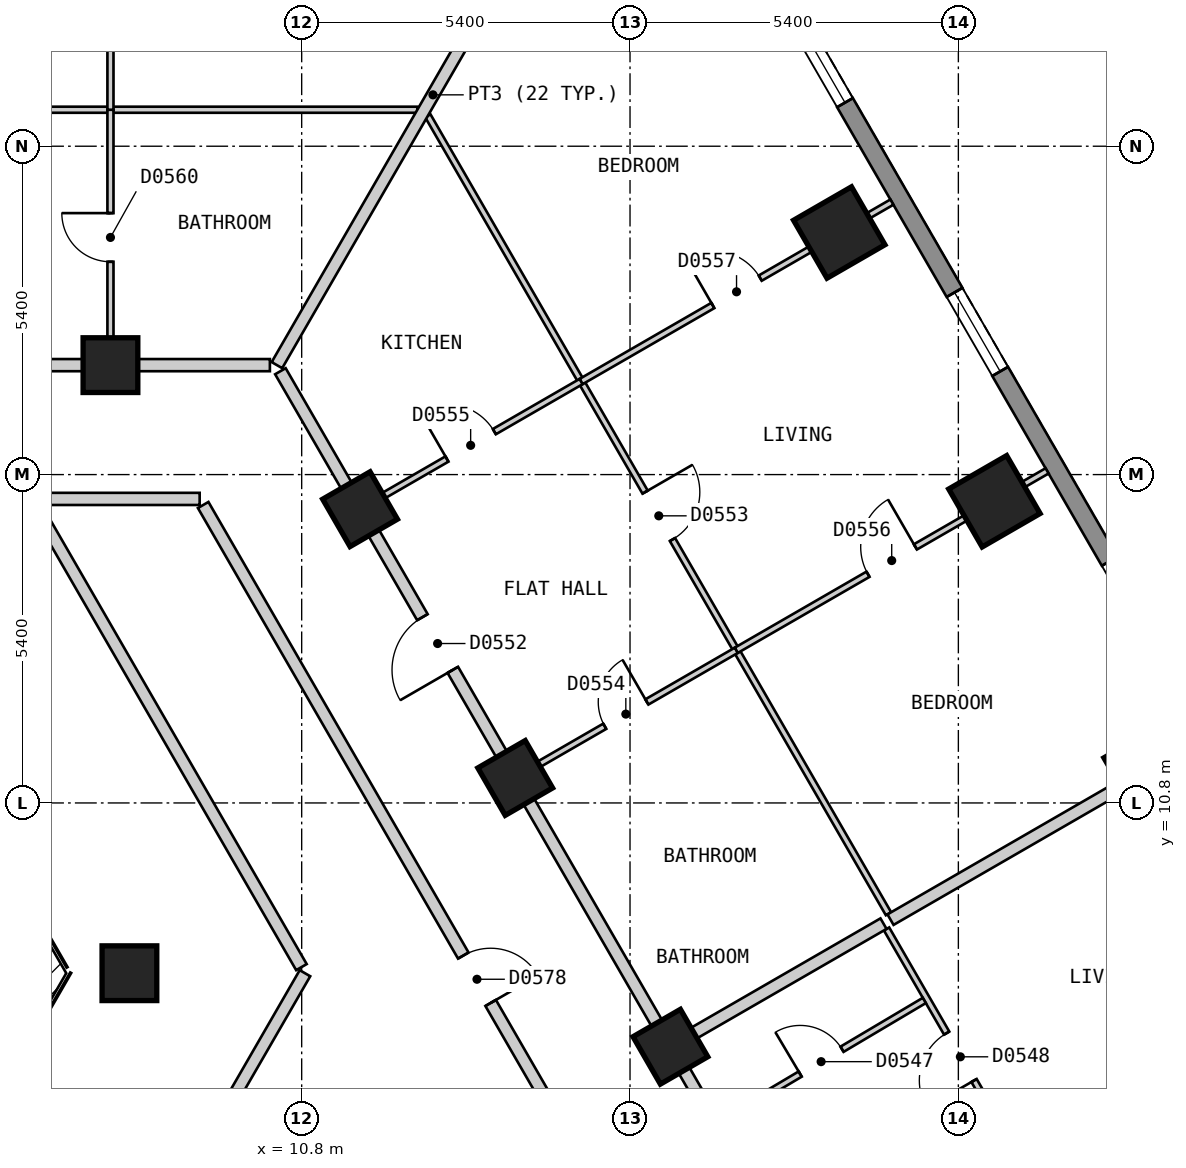
"""IFC4 building model, lengths in metres.
Left out: names, types, materials, properties, quantities, classifications, styles, units other than length and angle.
Written with IfcOpenShell. Run it as: python <this file> out.ifc"""

import sys

from ifc_helpers import new_model, si_unit, direction, frame, frame_2d, origin, origin_2d, place, context, subcontext, project, spatial, polyline, rectangle, outline, extrude, element, fill, save


model = new_model("IFC4")
c1 = context("Model", 3, precision=1e-05, world=origin(), true_north=direction((0.0, 1.0)))
c2 = subcontext(c1, "Body", "Model", "MODEL_VIEW")
j1 = project(units=[si_unit("LENGTHUNIT", "METRE"), si_unit("PLANEANGLEUNIT", "RADIAN")], contexts=[c1])
p1 = place(None, origin())
s1 = spatial("IfcSite", under=j1, at=p1, CompositionType="ELEMENT")
p2 = place(p1, origin())
s2 = spatial("IfcBuilding", under=s1, at=p2, CompositionType="ELEMENT")
p3 = place(p2, frame((0.0, 0.0, 44.4)))
s3 = spatial("IfcBuildingStorey", under=s2, at=p3, CompositionType="ELEMENT", Elevation=44.4)
for number, where, z_axis, x_axis in (
    (1, (24.745, 11.341, 0.0), (0.0, 0.0, 1.0), (-0.5, 0.866, 0.0)),
    (2, (22.193, 15.761, 0.0), (0.0, 0.0, 1.0), (-0.5, 0.866, 0.0)),
    (3, (19.641, 20.181, 0.0), (0.0, 0.0, 1.0), (-0.5, 0.866, 0.0)),
):
    element("IfcColumn", number, at=place(p3, frame(where, z_axis=z_axis, x_axis=x_axis)), inside=s3, PredefinedType="COLUMN", context=c2, shape_type="SweptSolid", body=[
        extrude(rectangle(XDim=1.1, YDim=1.1, at=origin_2d()), origin(), (0.0, 0.0, 1.0), 3.0),
    ])
for number, where, z_axis, x_axis in (
    (4, (16.864, 6.791, 0.0), (0.0, 0.0, 1.0), (-0.5, 0.866, 0.0)),
    (5, (14.312, 11.211, 0.0), (0.0, 0.0, 1.0), (-0.5, 0.866, 0.0)),
    (6, (7.967, 8.0, 0.0), (0.0, 0.0, 1.0), (1.0, 0.0, 0.0)),
    (7, (11.76, 15.631, 0.0), (0.0, 0.0, 1.0), (-0.5, 0.866, 0.0)),
    (8, (7.655, 18.0, 0.0), (0.0, 0.0, 1.0), (-1.0, 0.0, 0.0)),
):
    element("IfcColumn", number, at=place(p3, frame(where, z_axis=z_axis, x_axis=x_axis)), inside=s3, PredefinedType="COLUMN", context=c2, shape_type="SweptSolid", body=[
        extrude(rectangle(XDim=0.9, YDim=0.9, at=origin_2d()), origin(), (0.0, 0.0, 1.0), 3.0),
    ])
p4 = place(p3, frame((31.22, 2.425, 0.0), z_axis=(0.0, 0.0, 1.0), x_axis=(-0.500001938803, 0.866024284413, 0.0)))
e9 = element("IfcWall", 9, at=p4, inside=s3, PredefinedType="SOLIDWALL", context=c2, shape_type="SweptSolid", body=[
    extrude(outline(polyline([(0.0, -0.15), (27.02, -0.15), (26.94, 0.15), (0.08, 0.15), (0.0, -0.15)])), origin(), (0.0, 0.0, 1.0), 2.7),
])
p5 = place(p4, frame((2.553, 0.0, 0.15)))
e10 = element("IfcOpeningElement", 10, at=p5, cuts=e9, PredefinedType="OPENING", context=c2, shape_type="SweptSolid", body=[
    extrude(rectangle(XDim=1.5, YDim=2.1, at=frame_2d((0.75, 1.05))), frame((0.0, 0.16, 0.0), z_axis=(0.0, -1.0, 0.0), x_axis=(1.0, 0.0, 0.0)), (0.0, 0.0, 1.0), 0.32),
])
p6 = place(p4, frame((7.657, 0.0, 0.15)))
e11 = element("IfcOpeningElement", 11, at=p6, cuts=e9, PredefinedType="OPENING", context=c2, shape_type="SweptSolid", body=[
    extrude(rectangle(XDim=1.5, YDim=2.1, at=frame_2d((0.75, 1.05))), frame((0.0, 0.16, 0.0), z_axis=(0.0, -1.0, 0.0), x_axis=(1.0, 0.0, 0.0)), (0.0, 0.0, 1.0), 0.32),
])
p7 = place(p4, frame((12.761, 0.0, 0.15)))
e12 = element("IfcOpeningElement", 12, at=p7, cuts=e9, PredefinedType="OPENING", context=c2, shape_type="SweptSolid", body=[
    extrude(rectangle(XDim=1.5, YDim=2.1, at=frame_2d((0.75, 1.05))), frame((0.0, 0.16, 0.0), z_axis=(0.0, -1.0, 0.0), x_axis=(1.0, 0.0, 0.0)), (0.0, 0.0, 1.0), 0.32),
])
p8 = place(p4, frame((17.865, 0.0, 0.15)))
e13 = element("IfcOpeningElement", 13, at=p8, cuts=e9, PredefinedType="OPENING", context=c2, shape_type="SweptSolid", body=[
    extrude(rectangle(XDim=1.5, YDim=2.1, at=frame_2d((0.75, 1.05))), frame((0.0, 0.16, 0.0), z_axis=(0.0, -1.0, 0.0), x_axis=(1.0, 0.0, 0.0)), (0.0, 0.0, 1.0), 0.32),
])
p9 = place(p4, frame((22.969, 0.0, 0.15)))
e14 = element("IfcOpeningElement", 14, at=p9, cuts=e9, PredefinedType="OPENING", context=c2, shape_type="SweptSolid", body=[
    extrude(rectangle(XDim=1.5, YDim=2.1, at=frame_2d((0.75, 1.05))), frame((0.0, 0.16, 0.0), z_axis=(0.0, -1.0, 0.0), x_axis=(1.0, 0.0, 0.0)), (0.0, 0.0, 1.0), 0.32),
])
p10 = place(p3, frame((6.409, 15.7, 0.0), z_axis=(0.0, 0.0, 1.0), x_axis=(0.499930377127, -0.866065596838, 0.0)))
e15 = element("IfcWall", 15, at=p10, inside=s3, PredefinedType="PARTITIONING", context=c2, shape_type="SweptSolid", body=[
    extrude(rectangle(XDim=8.775, YDim=0.2, at=frame_2d((4.388, 0.0))), origin(), (0.0, 0.0, 1.0), 2.7),
])
p11 = place(p3, frame((9.18, 15.7, 0.0), z_axis=(0.0, 0.0, 1.0), x_axis=(0.500003652032, -0.866023295272, 0.0)))
e16 = element("IfcWall", 16, at=p11, inside=s3, PredefinedType="PARTITIONING", context=c2, shape_type="SweptSolid", body=[
    extrude(rectangle(XDim=18.012, YDim=0.2, at=frame_2d((9.006, 0.0))), origin(), (0.0, 0.0, 1.0), 2.7),
])
p12 = place(p11, frame((8.556, 0.0, 0.0)))
e17 = element("IfcOpeningElement", 17, at=p12, cuts=e16, PredefinedType="OPENING", context=c2, shape_type="SweptSolid", body=[
    extrude(rectangle(XDim=0.9, YDim=2.1, at=frame_2d((0.45, 1.05))), frame((0.0, 0.11, 0.0), z_axis=(0.0, -1.0, 0.0), x_axis=(1.0, 0.0, 0.0)), (0.0, 0.0, 1.0), 0.22),
])
p13 = place(p3, frame((10.45, 17.9, 0.0), z_axis=(0.0, 0.0, 1.0), x_axis=(0.500034352617, -0.866005569383, 0.0)))
e18 = element("IfcWall", 18, at=p13, inside=s3, PredefinedType="PARTITIONING", context=c2, shape_type="SweptSolid", body=[
    extrude(rectangle(XDim=20.553, YDim=0.2, at=frame_2d((10.276, 0.0))), origin(), (0.0, 0.0, 1.0), 2.7),
])
p14 = place(p13, frame((14.902, 0.0, 0.0)))
e19 = element("IfcOpeningElement", 19, at=p14, cuts=e18, PredefinedType="OPENING", context=c2, shape_type="SweptSolid", body=[
    extrude(rectangle(XDim=1.0, YDim=2.1, at=frame_2d((0.5, 1.05))), frame((0.0, 0.11, 0.0), z_axis=(0.0, -1.0, 0.0), x_axis=(1.0, 0.0, 0.0)), (0.0, 0.0, 1.0), 0.22),
])
p15 = place(p13, frame((4.671, 0.0, 0.0)))
e20 = element("IfcOpeningElement", 20, at=p15, cuts=e18, PredefinedType="OPENING", context=c2, shape_type="SweptSolid", body=[
    extrude(rectangle(XDim=1.0, YDim=2.1, at=frame_2d((0.5, 1.05))), frame((0.0, 0.11, 0.0), z_axis=(0.0, -1.0, 0.0), x_axis=(1.0, 0.0, 0.0)), (0.0, 0.0, 1.0), 0.22),
])
p16 = place(p3, frame((6.351, 15.8, 0.0), z_axis=(0.0, 0.0, 1.0), x_axis=(1.0, 0.0, 0.0)))
e21 = element("IfcWall", 21, at=p16, inside=s3, PredefinedType="PARTITIONING", context=c2, shape_type="SweptSolid", body=[
    extrude(rectangle(XDim=2.771, YDim=0.2, at=frame_2d((1.385, 0.0))), origin(), (0.0, 0.0, 1.0), 2.7),
])
p17 = place(p3, frame((-10.276, 18.0, 0.0), z_axis=(0.0, 0.0, 1.0), x_axis=(1.0, 0.0, 0.0)))
e22 = element("IfcWall", 22, at=p17, inside=s3, PredefinedType="PARTITIONING", context=c2, shape_type="SweptSolid", body=[
    extrude(rectangle(XDim=20.553, YDim=0.2, at=frame_2d((10.276, 0.0))), origin(), (0.0, 0.0, 1.0), 2.7),
])
p18 = place(p17, frame((14.879, 0.0, 0.0)))
e23 = element("IfcOpeningElement", 23, at=p18, cuts=e22, PredefinedType="OPENING", context=c2, shape_type="SweptSolid", body=[
    extrude(rectangle(XDim=1.0, YDim=2.1, at=frame_2d((0.5, 1.05))), frame((0.0, 0.11, 0.0), z_axis=(0.0, -1.0, 0.0), x_axis=(1.0, 0.0, 0.0)), (0.0, 0.0, 1.0), 0.22),
])
p19 = place(p17, frame((4.671, 0.0, 0.0)))
e24 = element("IfcOpeningElement", 24, at=p19, cuts=e22, PredefinedType="OPENING", context=c2, shape_type="SweptSolid", body=[
    extrude(rectangle(XDim=1.0, YDim=2.1, at=frame_2d((0.5, 1.05))), frame((0.0, 0.11, 0.0), z_axis=(0.0, -1.0, 0.0), x_axis=(1.0, 0.0, 0.0)), (0.0, 0.0, 1.0), 0.22),
])
p20 = place(p3, frame((7.028, 1.373, 0.0), z_axis=(0.0, 0.0, 1.0), x_axis=(0.49998574534, 0.86603363356, 0.0)))
e25 = element("IfcWall", 25, at=p20, inside=s3, PredefinedType="PARTITIONING", context=c2, shape_type="SweptSolid", body=[
    extrude(rectangle(XDim=7.652, YDim=0.2, at=frame_2d((3.826, 0.0))), origin(), (0.0, 0.0, 1.0), 2.7),
])
p21 = place(p3, frame((20.419, 8.728, 0.0), z_axis=(0.0, 0.0, 1.0), x_axis=(0.499958946799, -0.866049104564, 0.0)))
e26 = element("IfcWall", 26, at=p21, inside=s3, PredefinedType="PARTITIONING", context=c2, shape_type="SweptSolid", body=[
    extrude(rectangle(XDim=5.004, YDim=0.1, at=frame_2d((2.502, 0.0))), origin(), (0.0, 0.0, 1.0), 2.7),
])
p22 = place(p21, frame((1.978, 0.0, 0.0)))
e27 = element("IfcOpeningElement", 27, at=p22, cuts=e26, PredefinedType="OPENING", context=c2, shape_type="SweptSolid", body=[
    extrude(rectangle(XDim=0.9, YDim=2.1, at=frame_2d((0.45, 1.05))), frame((0.0, 0.06, 0.0), z_axis=(0.0, -1.0, 0.0), x_axis=(1.0, 0.0, 0.0)), (0.0, 0.0, 1.0), 0.12),
])
p23 = place(p3, frame((12.875, 22.1, 0.0), z_axis=(0.0, 0.0, 1.0), x_axis=(0.499994897061, -0.866028349948, 0.0)))
e28 = element("IfcWall", 28, at=p23, inside=s3, PredefinedType="PARTITIONING", context=c2, shape_type="SweptSolid", body=[
    extrude(rectangle(XDim=15.152, YDim=0.1, at=frame_2d((7.576, 0.0))), origin(), (0.0, 0.0, 1.0), 2.7),
])
p24 = place(p23, frame((7.146, 0.0, 0.0)))
e29 = element("IfcOpeningElement", 29, at=p24, cuts=e28, PredefinedType="OPENING", context=c2, shape_type="SweptSolid", body=[
    extrude(rectangle(XDim=0.9, YDim=2.1, at=frame_2d((0.45, 1.05))), frame((0.0, 0.06, 0.0), z_axis=(0.0, -1.0, 0.0), x_axis=(1.0, 0.0, 0.0)), (0.0, 0.0, 1.0), 0.12),
])
p25 = place(p3, frame((-2.453, 22.2, 0.0), z_axis=(0.0, 0.0, 1.0), x_axis=(1.0, 0.0, 0.0)))
e30 = element("IfcWall", 30, at=p25, inside=s3, PredefinedType="PARTITIONING", context=c2, shape_type="SweptSolid", body=[
    extrude(rectangle(XDim=15.155, YDim=0.1, at=frame_2d((7.577, 0.0))), origin(), (0.0, 0.0, 1.0), 2.7),
])
p26 = place(p25, frame((7.106, 0.0, 0.0)))
e31 = element("IfcOpeningElement", 31, at=p26, cuts=e30, PredefinedType="OPENING", context=c2, shape_type="SweptSolid", body=[
    extrude(rectangle(XDim=0.9, YDim=2.1, at=frame_2d((0.45, 1.05))), frame((0.0, 0.06, 0.0), z_axis=(0.0, -1.0, 0.0), x_axis=(1.0, 0.0, 0.0)), (0.0, 0.0, 1.0), 0.12),
])
p27 = place(p3, frame((7.655, 18.1, 0.0), z_axis=(0.0, 0.0, 1.0), x_axis=(0.0, 1.0, 0.0)))
e32 = element("IfcWall", 32, at=p27, inside=s3, PredefinedType="PARTITIONING", context=c2, shape_type="SweptSolid", body=[
    extrude(rectangle(XDim=4.1, YDim=0.1, at=frame_2d((2.05, 0.0))), origin(), (0.0, 0.0, 1.0), 2.7),
])
p28 = place(p27, frame((1.6, 0.0, 0.0)))
e33 = element("IfcOpeningElement", 33, at=p28, cuts=e32, PredefinedType="OPENING", context=c2, shape_type="SweptSolid", body=[
    extrude(rectangle(XDim=0.8, YDim=2.1, at=frame_2d((0.4, 1.05))), frame((0.0, 0.06, 0.0), z_axis=(0.0, -1.0, 0.0), x_axis=(1.0, 0.0, 0.0)), (0.0, 0.0, 1.0), 0.12),
])
p29 = place(p3, frame((19.503, 2.421, 0.0), z_axis=(0.0, 0.0, 1.0), x_axis=(0.866065245018, 0.499930986609, 0.0)))
e34 = element("IfcWall", 34, at=p29, inside=s3, PredefinedType="PARTITIONING", context=c2, shape_type="SweptSolid", body=[
    extrude(rectangle(XDim=10.0, YDim=0.1, at=frame_2d((5.0, 0.0))), origin(), (0.0, 0.0, 1.0), 2.7),
])
p30 = place(p29, frame((6.523, 0.0, 0.0)))
e35 = element("IfcOpeningElement", 35, at=p30, cuts=e34, PredefinedType="OPENING", context=c2, shape_type="SweptSolid", body=[
    extrude(rectangle(XDim=0.9, YDim=2.1, at=frame_2d((0.45, 1.05))), frame((0.0, 0.06, 0.0), z_axis=(0.0, -1.0, 0.0), x_axis=(1.0, 0.0, 0.0)), (0.0, 0.0, 1.0), 0.12),
])
p31 = place(p3, frame((11.847, 15.681, 0.0), z_axis=(0.0, 0.0, 1.0), x_axis=(0.865980278416, 0.500078151287, 0.0)))
e36 = element("IfcWall", 36, at=p31, inside=s3, PredefinedType="PARTITIONING", context=c2, shape_type="SweptSolid", body=[
    extrude(rectangle(XDim=4.099, YDim=0.1, at=frame_2d((2.05, 0.0))), origin(), (0.0, 0.0, 1.0), 2.7),
])
p32 = place(p31, frame((1.55, 0.0, 0.0)))
e37 = element("IfcOpeningElement", 37, at=p32, cuts=e36, PredefinedType="OPENING", context=c2, shape_type="SweptSolid", body=[
    extrude(rectangle(XDim=0.9, YDim=2.1, at=frame_2d((0.45, 1.05))), frame((0.0, 0.06, 0.0), z_axis=(0.0, -1.0, 0.0), x_axis=(1.0, 0.0, 0.0)), (0.0, 0.0, 1.0), 0.12),
])
p33 = place(p3, frame((14.399, 11.261, 0.0), z_axis=(0.0, 0.0, 1.0), x_axis=(0.865980278416, 0.500078151287, 0.0)))
e38 = element("IfcWall", 38, at=p33, inside=s3, PredefinedType="PARTITIONING", context=c2, shape_type="SweptSolid", body=[
    extrude(rectangle(XDim=4.099, YDim=0.1, at=frame_2d((2.05, 0.0))), origin(), (0.0, 0.0, 1.0), 2.7),
])
p34 = place(p33, frame((1.6, 0.0, 0.0)))
e39 = element("IfcOpeningElement", 39, at=p34, cuts=e38, PredefinedType="OPENING", context=c2, shape_type="SweptSolid", body=[
    extrude(rectangle(XDim=0.8, YDim=2.1, at=frame_2d((0.4, 1.05))), frame((0.0, 0.06, 0.0), z_axis=(0.0, -1.0, 0.0), x_axis=(1.0, 0.0, 0.0)), (0.0, 0.0, 1.0), 0.12),
])
p35 = place(p3, frame((17.688, 5.564, 0.0), z_axis=(0.0, 0.0, 1.0), x_axis=(0.860107296662, 0.510113162179, 0.0)))
e40 = element("IfcWall", 40, at=p35, inside=s3, PredefinedType="PARTITIONING", context=c2, shape_type="SweptSolid", body=[
    extrude(rectangle(XDim=3.897, YDim=0.1, at=frame_2d((1.949, 0.0))), origin(), (0.0, 0.0, 1.0), 2.7),
])
p36 = place(p35, frame((1.524, 0.0, 0.0)))
e41 = element("IfcOpeningElement", 41, at=p36, cuts=e40, PredefinedType="OPENING", context=c2, shape_type="SweptSolid", body=[
    extrude(rectangle(XDim=0.8, YDim=2.1, at=frame_2d((0.4, 1.05))), frame((0.0, 0.06, 0.0), z_axis=(0.0, -1.0, 0.0), x_axis=(1.0, 0.0, 0.0)), (0.0, 0.0, 1.0), 0.12),
])
p37 = place(p3, frame((10.393, 18.0, 0.0), z_axis=(0.0, 0.0, 1.0), x_axis=(0.499945497007, 0.866056868816, 0.0)))
e42 = element("IfcWall", 42, at=p37, inside=s3, PredefinedType="PARTITIONING", context=c2, shape_type="SweptSolid", body=[
    extrude(rectangle(XDim=10.265, YDim=0.2, at=frame_2d((5.132, 0.0))), origin(), (0.0, 0.0, 1.0), 2.7),
])
p38 = place(p3, frame((16.95, 6.841, 0.0), z_axis=(0.0, 0.0, 1.0), x_axis=(0.866031112038, 0.499990112884, 0.0)))
e43 = element("IfcWall", 43, at=p38, inside=s3, PredefinedType="PARTITIONING", context=c2, shape_type="SweptSolid", body=[
    extrude(rectangle(XDim=3.948, YDim=0.2, at=frame_2d((1.974, 0.0))), origin(), (0.0, 0.0, 1.0), 2.7),
])
p39 = place(p3, frame((20.484, 8.881, 0.0), z_axis=(0.0, 0.0, 1.0), x_axis=(0.866000821391, 0.500042575537, 0.0)))
e44 = element("IfcWall", 44, at=p39, inside=s3, PredefinedType="PARTITIONING", context=c2, shape_type="SweptSolid", body=[
    extrude(rectangle(XDim=5.919, YDim=0.2, at=frame_2d((2.96, 0.0))), origin(), (0.0, 0.0, 1.0), 2.7),
])
p40 = place(p3, frame((15.397, 17.731, 0.0), z_axis=(0.0, 0.0, 1.0), x_axis=(0.866052608538, 0.499952877023, 0.0)))
e45 = element("IfcWall", 45, at=p40, inside=s3, PredefinedType="PARTITIONING", context=c2, shape_type="SweptSolid", body=[
    extrude(rectangle(XDim=5.9, YDim=0.1, at=frame_2d((2.95, 0.0))), origin(), (0.0, 0.0, 1.0), 2.7),
])
p41 = place(p40, frame((2.5, 0.0, 0.0)))
e46 = element("IfcOpeningElement", 46, at=p41, cuts=e45, PredefinedType="OPENING", context=c2, shape_type="SweptSolid", body=[
    extrude(rectangle(XDim=0.9, YDim=2.1, at=frame_2d((0.45, 1.05))), frame((0.0, 0.06, 0.0), z_axis=(0.0, -1.0, 0.0), x_axis=(1.0, 0.0, 0.0)), (0.0, 0.0, 1.0), 0.12),
])
p42 = place(p3, frame((17.949, 13.311, 0.0), z_axis=(0.0, 0.0, 1.0), x_axis=(0.866052608538, 0.499952877023, 0.0)))
e47 = element("IfcWall", 47, at=p42, inside=s3, PredefinedType="PARTITIONING", context=c2, shape_type="SweptSolid", body=[
    extrude(rectangle(XDim=5.9, YDim=0.1, at=frame_2d((2.95, 0.0))), origin(), (0.0, 0.0, 1.0), 2.7),
])
p43 = place(p42, frame((2.5, 0.0, 0.0)))
e48 = element("IfcOpeningElement", 48, at=p43, cuts=e47, PredefinedType="OPENING", context=c2, shape_type="SweptSolid", body=[
    extrude(rectangle(XDim=0.9, YDim=2.1, at=frame_2d((0.45, 1.05))), frame((0.0, 0.06, 0.0), z_axis=(0.0, -1.0, 0.0), x_axis=(1.0, 0.0, 0.0)), (0.0, 0.0, 1.0), 0.12),
])
p44 = place(p3, frame((7.655, 22.2, 0.0), z_axis=(0.0, 0.0, 1.0), x_axis=(0.0, 1.0, 0.0)))
e49 = element("IfcWall", 49, at=p44, inside=s3, PredefinedType="PARTITIONING", context=c2, shape_type="SweptSolid", body=[
    extrude(rectangle(XDim=5.9, YDim=0.1, at=frame_2d((2.95, 0.0))), origin(), (0.0, 0.0, 1.0), 2.7),
])
p45 = place(p44, frame((2.5, 0.0, 0.0)))
e50 = element("IfcOpeningElement", 50, at=p45, cuts=e49, PredefinedType="OPENING", context=c2, shape_type="SweptSolid", body=[
    extrude(rectangle(XDim=0.9, YDim=2.1, at=frame_2d((0.45, 1.05))), frame((0.0, 0.06, 0.0), z_axis=(0.0, -1.0, 0.0), x_axis=(1.0, 0.0, 0.0)), (0.0, 0.0, 1.0), 0.12),
])
p46 = place(p8, origin())
e51 = element("IfcWindow", 51, at=p46, inside=s3, PartitioningType="SINGLE_PANEL", PredefinedType="WINDOW", context=c2, shape_type="SweptSolid", body=[
    extrude(rectangle(XDim=1.5, YDim=2.1, at=frame_2d((0.75, 1.05))), frame((0.0, 0.03, 0.0), z_axis=(0.0, -1.0, 0.0), x_axis=(1.0, 0.0, 0.0)), (0.0, 0.0, 1.0), 0.06),
])
fill(e13, e51)
p47 = place(p9, origin())
e52 = element("IfcWindow", 52, at=p47, inside=s3, PartitioningType="SINGLE_PANEL", PredefinedType="WINDOW", context=c2, shape_type="SweptSolid", body=[
    extrude(rectangle(XDim=1.5, YDim=2.1, at=frame_2d((0.75, 1.05))), frame((0.0, 0.03, 0.0), z_axis=(0.0, -1.0, 0.0), x_axis=(1.0, 0.0, 0.0)), (0.0, 0.0, 1.0), 0.06),
])
fill(e14, e52)
p48 = place(p36, origin())
e53 = element("IfcDoor", 53, at=p48, inside=s3, OperationType="SINGLE_SWING_LEFT", PredefinedType="DOOR", context=c2, shape_type="SweptSolid", body=[
    extrude(rectangle(XDim=0.8, YDim=2.1, at=frame_2d((0.4, 1.05))), frame((0.0, 0.025, 0.0), z_axis=(0.0, -1.0, 0.0), x_axis=(1.0, 0.0, 0.0)), (0.0, 0.0, 1.0), 0.05),
])
fill(e41, e53)
p49 = place(p22, origin())
e54 = element("IfcDoor", 54, at=p49, inside=s3, OperationType="SINGLE_SWING_RIGHT", PredefinedType="DOOR", context=c2, shape_type="SweptSolid", body=[
    extrude(rectangle(XDim=0.9, YDim=2.1, at=frame_2d((0.45, 1.05))), frame((0.0, 0.025, 0.0), z_axis=(0.0, -1.0, 0.0), x_axis=(1.0, 0.0, 0.0)), (0.0, 0.0, 1.0), 0.05),
])
fill(e27, e54)
p50 = place(p15, origin())
e55 = element("IfcDoor", 55, at=p50, inside=s3, OperationType="SINGLE_SWING_RIGHT", PredefinedType="DOOR", context=c2, shape_type="SweptSolid", body=[
    extrude(rectangle(XDim=1.0, YDim=2.1, at=frame_2d((0.5, 1.05))), frame((0.0, 0.025, 0.0), z_axis=(0.0, -1.0, 0.0), x_axis=(1.0, 0.0, 0.0)), (0.0, 0.0, 1.0), 0.05),
])
fill(e20, e55)
p51 = place(p24, origin())
e56 = element("IfcDoor", 56, at=p51, inside=s3, OperationType="SINGLE_SWING_LEFT", PredefinedType="DOOR", context=c2, shape_type="SweptSolid", body=[
    extrude(rectangle(XDim=0.9, YDim=2.1, at=frame_2d((0.45, 1.05))), frame((0.0, 0.025, 0.0), z_axis=(0.0, -1.0, 0.0), x_axis=(1.0, 0.0, 0.0)), (0.0, 0.0, 1.0), 0.05),
])
fill(e29, e56)
p52 = place(p34, origin())
e57 = element("IfcDoor", 57, at=p52, inside=s3, OperationType="SINGLE_SWING_RIGHT", PredefinedType="DOOR", context=c2, shape_type="SweptSolid", body=[
    extrude(rectangle(XDim=0.8, YDim=2.1, at=frame_2d((0.4, 1.05))), frame((0.0, 0.025, 0.0), z_axis=(0.0, -1.0, 0.0), x_axis=(1.0, 0.0, 0.0)), (0.0, 0.0, 1.0), 0.05),
])
fill(e39, e57)
p53 = place(p32, origin())
e58 = element("IfcDoor", 58, at=p53, inside=s3, OperationType="SINGLE_SWING_LEFT", PredefinedType="DOOR", context=c2, shape_type="SweptSolid", body=[
    extrude(rectangle(XDim=0.9, YDim=2.1, at=frame_2d((0.45, 1.05))), frame((0.0, 0.025, 0.0), z_axis=(0.0, -1.0, 0.0), x_axis=(1.0, 0.0, 0.0)), (0.0, 0.0, 1.0), 0.05),
])
fill(e37, e58)
p54 = place(p43, origin())
e59 = element("IfcDoor", 59, at=p54, inside=s3, OperationType="SINGLE_SWING_RIGHT", PredefinedType="DOOR", context=c2, shape_type="SweptSolid", body=[
    extrude(rectangle(XDim=0.9, YDim=2.1, at=frame_2d((0.45, 1.05))), frame((0.0, 0.025, 0.0), z_axis=(0.0, -1.0, 0.0), x_axis=(1.0, 0.0, 0.0)), (0.0, 0.0, 1.0), 0.05),
])
fill(e48, e59)
p55 = place(p41, origin())
e60 = element("IfcDoor", 60, at=p55, inside=s3, OperationType="SINGLE_SWING_LEFT", PredefinedType="DOOR", context=c2, shape_type="SweptSolid", body=[
    extrude(rectangle(XDim=0.9, YDim=2.1, at=frame_2d((0.45, 1.05))), frame((0.0, 0.025, 0.0), z_axis=(0.0, -1.0, 0.0), x_axis=(1.0, 0.0, 0.0)), (0.0, 0.0, 1.0), 0.05),
])
fill(e46, e60)
p56 = place(p28, origin())
e61 = element("IfcDoor", 61, at=p56, inside=s3, OperationType="SINGLE_SWING_RIGHT", PredefinedType="DOOR", context=c2, shape_type="SweptSolid", body=[
    extrude(rectangle(XDim=0.8, YDim=2.1, at=frame_2d((0.4, 1.05))), frame((0.0, 0.025, 0.0), z_axis=(0.0, -1.0, 0.0), x_axis=(1.0, 0.0, 0.0)), (0.0, 0.0, 1.0), 0.05),
])
fill(e33, e61)
p57 = place(p12, origin())
e62 = element("IfcDoor", 62, at=p57, inside=s3, OperationType="SINGLE_SWING_RIGHT", PredefinedType="DOOR", context=c2, shape_type="SweptSolid", body=[
    extrude(rectangle(XDim=0.9, YDim=2.1, at=frame_2d((0.45, 1.05))), frame((0.0, 0.025, 0.0), z_axis=(0.0, -1.0, 0.0), x_axis=(1.0, 0.0, 0.0)), (0.0, 0.0, 1.0), 0.05),
])
fill(e17, e62)
save(model, sys.argv[1])
